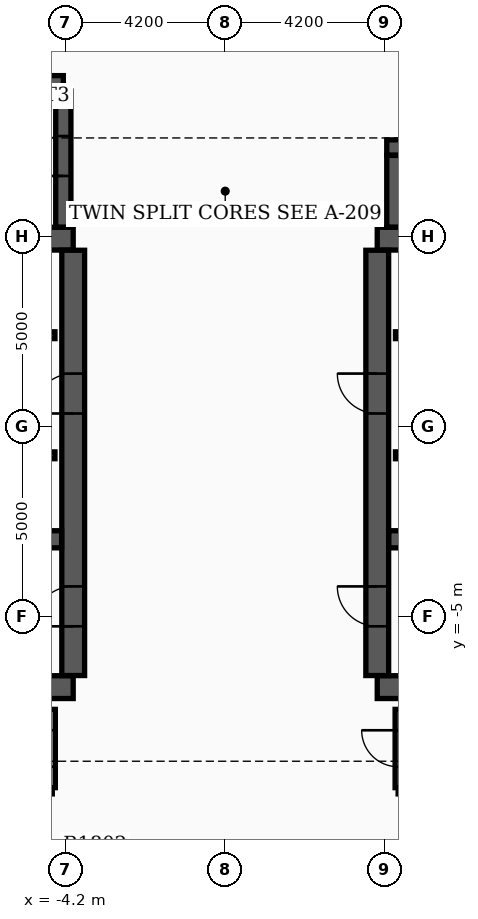
"""IFC4 building model, lengths in metres.
Left out: names, types, materials, properties, quantities, classifications, styles, units other than length and angle.
Written with IfcOpenShell. Run it as: python <this file> out.ifc"""

import sys

from ifc_helpers import new_model, si_unit, direction, frame, frame_2d, origin, place, context, subcontext, project, spatial, rectangle, extrude, element, fill, save


model = new_model("IFC4")
c1 = context("Model", 3, precision=1e-05, world=origin(), true_north=direction((0.0, 1.0)))
c2 = subcontext(c1, "Body", "Model", "MODEL_VIEW")
j1 = project(units=[si_unit("LENGTHUNIT", "METRE"), si_unit("PLANEANGLEUNIT", "RADIAN")], contexts=[c1])
p1 = place(None, origin())
s1 = spatial("IfcSite", under=j1, at=p1, CompositionType="ELEMENT")
p2 = place(p1, origin())
s2 = spatial("IfcBuilding", under=s1, at=p2, CompositionType="ELEMENT")
p3 = place(p2, frame((0.0, 0.0, 116.4)))
s3 = spatial("IfcBuildingStorey", under=s2, at=p3, CompositionType="ELEMENT", Elevation=116.4)
for number, where, z_axis, x_axis in (
    (1, (-12.4, -6.85, 0.0), (0.0, 0.0, 1.0), (1.0, 0.0, 0.0)),
    (2, (-12.4, 4.95, 0.0), (0.0, 0.0, 1.0), (1.0, 0.0, 0.0)),
):
    element("IfcWall", number, at=place(p3, frame(where, z_axis=z_axis, x_axis=x_axis)), inside=s3, PredefinedType="SHEAR", context=c2, shape_type="SweptSolid", body=[
        extrude(rectangle(XDim=8.4, YDim=0.6, at=frame_2d((4.2, 0.0))), origin(), (0.0, 0.0, 1.0), 3.7),
    ])
p4 = place(p3, frame((-4.0, -6.545, 0.0), z_axis=(0.0, 0.0, 1.0), x_axis=(0.0, 1.0, 0.0)))
e3 = element("IfcWall", 3, at=p4, inside=s3, PredefinedType="SHEAR", context=c2, shape_type="SweptSolid", body=[
    extrude(rectangle(XDim=11.19, YDim=0.6, at=frame_2d((5.595, 0.0))), origin(), (0.0, 0.0, 1.0), 3.7),
])
p5 = place(p4, frame((1.295, 0.0, 0.0)))
e4 = element("IfcOpeningElement", 4, at=p5, cuts=e3, PredefinedType="OPENING", context=c2, shape_type="SweptSolid", body=[
    extrude(rectangle(XDim=1.05, YDim=2.15, at=frame_2d((0.525, 1.075))), frame((0.0, 0.31, 0.0), z_axis=(0.0, -1.0, 0.0), x_axis=(1.0, 0.0, 0.0)), (0.0, 0.0, 1.0), 0.62),
])
p6 = place(p4, frame((6.895, 0.0, 0.0)))
e5 = element("IfcOpeningElement", 5, at=p6, cuts=e3, PredefinedType="OPENING", context=c2, shape_type="SweptSolid", body=[
    extrude(rectangle(XDim=1.05, YDim=2.15, at=frame_2d((0.525, 1.075))), frame((0.0, 0.31, 0.0), z_axis=(0.0, -1.0, 0.0), x_axis=(1.0, 0.0, 0.0)), (0.0, 0.0, 1.0), 0.62),
])
p7 = place(p3, frame((-12.095, -2.96, 0.0), z_axis=(0.0, 0.0, 1.0), x_axis=(1.0, 0.0, 0.0)))
e6 = element("IfcWall", 6, at=p7, inside=s3, PredefinedType="SHEAR", context=c2, shape_type="SweptSolid", body=[
    extrude(rectangle(XDim=7.79, YDim=0.45, at=frame_2d((3.895, 0.0))), origin(), (0.0, 0.0, 1.0), 3.7),
])
for number, where, z_axis, x_axis in (
    (7, (4.0, -6.85, 0.0), (0.0, 0.0, 1.0), (1.0, 0.0, 0.0)),
    (8, (4.0, 4.95, 0.0), (0.0, 0.0, 1.0), (1.0, 0.0, 0.0)),
):
    element("IfcWall", number, at=place(p3, frame(where, z_axis=z_axis, x_axis=x_axis)), inside=s3, PredefinedType="SHEAR", context=c2, shape_type="SweptSolid", body=[
        extrude(rectangle(XDim=8.4, YDim=0.6, at=frame_2d((4.2, 0.0))), origin(), (0.0, 0.0, 1.0), 3.7),
    ])
p8 = place(p3, frame((4.0, -6.545, 0.0), z_axis=(0.0, 0.0, 1.0), x_axis=(0.0, 1.0, 0.0)))
e9 = element("IfcWall", 9, at=p8, inside=s3, PredefinedType="SHEAR", context=c2, shape_type="SweptSolid", body=[
    extrude(rectangle(XDim=11.19, YDim=0.6, at=frame_2d((5.595, 0.0))), origin(), (0.0, 0.0, 1.0), 3.7),
])
p9 = place(p8, frame((1.295, 0.0, 0.0)))
e10 = element("IfcOpeningElement", 10, at=p9, cuts=e9, PredefinedType="OPENING", context=c2, shape_type="SweptSolid", body=[
    extrude(rectangle(XDim=1.05, YDim=2.15, at=frame_2d((0.525, 1.075))), frame((0.0, 0.31, 0.0), z_axis=(0.0, -1.0, 0.0), x_axis=(1.0, 0.0, 0.0)), (0.0, 0.0, 1.0), 0.62),
])
p10 = place(p8, frame((6.895, 0.0, 0.0)))
e11 = element("IfcOpeningElement", 11, at=p10, cuts=e9, PredefinedType="OPENING", context=c2, shape_type="SweptSolid", body=[
    extrude(rectangle(XDim=1.05, YDim=2.15, at=frame_2d((0.525, 1.075))), frame((0.0, 0.31, 0.0), z_axis=(0.0, -1.0, 0.0), x_axis=(1.0, 0.0, 0.0)), (0.0, 0.0, 1.0), 0.62),
])
p11 = place(p3, frame((4.305, -2.96, 0.0), z_axis=(0.0, 0.0, 1.0), x_axis=(1.0, 0.0, 0.0)))
e12 = element("IfcWall", 12, at=p11, inside=s3, PredefinedType="SHEAR", context=c2, shape_type="SweptSolid", body=[
    extrude(rectangle(XDim=7.79, YDim=0.45, at=frame_2d((3.895, 0.0))), origin(), (0.0, 0.0, 1.0), 3.7),
])
p12 = place(p3, frame((-12.22, 9.04, 0.0), z_axis=(0.0, 0.0, 1.0), x_axis=(1.0, 0.0, 0.0)))
e13 = element("IfcWall", 13, at=p12, inside=s3, PredefinedType="SHEAR", context=c2, shape_type="SweptSolid", body=[
    extrude(rectangle(XDim=7.96, YDim=0.4, at=frame_2d((3.98, 0.0))), origin(), (0.0, 0.0, 1.0), 3.7),
])
p13 = place(p3, frame((-4.26, 5.255, 0.0), z_axis=(0.0, 0.0, 1.0), x_axis=(0.0, 1.0, 0.0)))
e14 = element("IfcWall", 14, at=p13, inside=s3, PredefinedType="SHEAR", context=c2, shape_type="SweptSolid", body=[
    extrude(rectangle(XDim=3.58, YDim=0.4, at=frame_2d((1.79, 0.0))), origin(), (0.0, 0.0, 1.0), 3.7),
])
p14 = place(p13, frame((1.345, 0.0, 0.0)))
e15 = element("IfcOpeningElement", 15, at=p14, cuts=e14, PredefinedType="OPENING", context=c2, shape_type="SweptSolid", body=[
    extrude(rectangle(XDim=1.05, YDim=2.15, at=frame_2d((0.525, 1.075))), frame((0.0, 0.21, 0.0), z_axis=(0.0, -1.0, 0.0), x_axis=(1.0, 0.0, 0.0)), (0.0, 0.0, 1.0), 0.42),
])
p15 = place(p3, frame((4.45, 5.255, 0.0), z_axis=(0.0, 0.0, 1.0), x_axis=(0.0, 1.0, 0.0)))
e16 = element("IfcWall", 16, at=p15, inside=s3, PredefinedType="SHEAR", context=c2, shape_type="SweptSolid", body=[
    extrude(rectangle(XDim=1.885, YDim=0.4, at=frame_2d((0.942, 0.0))), origin(), (0.0, 0.0, 1.0), 3.7),
])
p16 = place(p3, frame((4.25, 7.35, 0.0), z_axis=(0.0, 0.0, 1.0), x_axis=(1.0, 0.0, 0.0)))
e17 = element("IfcWall", 17, at=p16, inside=s3, PredefinedType="SHEAR", context=c2, shape_type="SweptSolid", body=[
    extrude(rectangle(XDim=5.4, YDim=0.4, at=frame_2d((2.7, 0.0))), origin(), (0.0, 0.0, 1.0), 3.7),
])
p17 = place(p3, frame((-11.9, 2.41, 0.0), z_axis=(0.0, 0.0, 1.0), x_axis=(1.0, 0.0, 0.0)))
e18 = element("IfcWall", 18, at=p17, inside=s3, PredefinedType="SOLIDWALL", context=c2, shape_type="SweptSolid", body=[
    extrude(rectangle(XDim=7.42, YDim=0.18, at=frame_2d((3.71, 0.0))), origin(), (0.0, 0.0, 1.0), 2.96),
])
p18 = place(p17, frame((0.55, 0.0, 0.0)))
e19 = element("IfcOpeningElement", 19, at=p18, cuts=e18, PredefinedType="OPENING", context=c2, shape_type="SweptSolid", body=[
    extrude(rectangle(XDim=1.1, YDim=2.15, at=frame_2d((0.55, 1.075))), frame((0.0, 0.1, 0.0), z_axis=(0.0, -1.0, 0.0), x_axis=(1.0, 0.0, 0.0)), (0.0, 0.0, 1.0), 0.2),
])
p19 = place(p17, frame((4.9, 0.0, 0.0)))
e20 = element("IfcOpeningElement", 20, at=p19, cuts=e18, PredefinedType="OPENING", context=c2, shape_type="SweptSolid", body=[
    extrude(rectangle(XDim=0.88, YDim=2.1, at=frame_2d((0.44, 1.05))), frame((0.0, 0.1, 0.0), z_axis=(0.0, -1.0, 0.0), x_axis=(1.0, 0.0, 0.0)), (0.0, 0.0, 1.0), 0.2),
])
p20 = place(p3, frame((4.48, 2.41, 0.0), z_axis=(0.0, 0.0, 1.0), x_axis=(1.0, 0.0, 0.0)))
e21 = element("IfcWall", 21, at=p20, inside=s3, PredefinedType="SOLIDWALL", context=c2, shape_type="SweptSolid", body=[
    extrude(rectangle(XDim=7.42, YDim=0.18, at=frame_2d((3.71, 0.0))), origin(), (0.0, 0.0, 1.0), 2.96),
])
p21 = place(p20, frame((5.67, 0.0, 0.0)))
e22 = element("IfcOpeningElement", 22, at=p21, cuts=e21, PredefinedType="OPENING", context=c2, shape_type="SweptSolid", body=[
    extrude(rectangle(XDim=1.1, YDim=2.15, at=frame_2d((0.55, 1.075))), frame((0.0, 0.1, 0.0), z_axis=(0.0, -1.0, 0.0), x_axis=(1.0, 0.0, 0.0)), (0.0, 0.0, 1.0), 0.2),
])
p22 = place(p20, frame((1.6, 0.0, 0.0)))
e23 = element("IfcOpeningElement", 23, at=p22, cuts=e21, PredefinedType="OPENING", context=c2, shape_type="SweptSolid", body=[
    extrude(rectangle(XDim=0.88, YDim=2.1, at=frame_2d((0.44, 1.05))), frame((0.0, 0.1, 0.0), z_axis=(0.0, -1.0, 0.0), x_axis=(1.0, 0.0, 0.0)), (0.0, 0.0, 1.0), 0.2),
])
p23 = place(p3, frame((-11.9, -0.75, 0.0), z_axis=(0.0, 0.0, 1.0), x_axis=(1.0, 0.0, 0.0)))
e24 = element("IfcWall", 24, at=p23, inside=s3, PredefinedType="SOLIDWALL", context=c2, shape_type="SweptSolid", body=[
    extrude(rectangle(XDim=7.42, YDim=0.18, at=frame_2d((3.71, 0.0))), origin(), (0.0, 0.0, 1.0), 2.96),
])
p24 = place(p23, frame((0.45, 0.0, 0.0)))
e25 = element("IfcOpeningElement", 25, at=p24, cuts=e24, PredefinedType="OPENING", context=c2, shape_type="SweptSolid", body=[
    extrude(rectangle(XDim=1.1, YDim=2.15, at=frame_2d((0.55, 1.075))), frame((0.0, 0.1, 0.0), z_axis=(0.0, -1.0, 0.0), x_axis=(1.0, 0.0, 0.0)), (0.0, 0.0, 1.0), 0.2),
])
p25 = place(p23, frame((2.35, 0.0, 0.0)))
e26 = element("IfcOpeningElement", 26, at=p25, cuts=e24, PredefinedType="OPENING", context=c2, shape_type="SweptSolid", body=[
    extrude(rectangle(XDim=1.1, YDim=2.15, at=frame_2d((0.55, 1.075))), frame((0.0, 0.1, 0.0), z_axis=(0.0, -1.0, 0.0), x_axis=(1.0, 0.0, 0.0)), (0.0, 0.0, 1.0), 0.2),
])
p26 = place(p3, frame((4.48, -0.75, 0.0), z_axis=(0.0, 0.0, 1.0), x_axis=(1.0, 0.0, 0.0)))
e27 = element("IfcWall", 27, at=p26, inside=s3, PredefinedType="SOLIDWALL", context=c2, shape_type="SweptSolid", body=[
    extrude(rectangle(XDim=7.42, YDim=0.18, at=frame_2d((3.71, 0.0))), origin(), (0.0, 0.0, 1.0), 2.96),
])
p27 = place(p26, frame((0.52, 0.0, 0.0)))
e28 = element("IfcOpeningElement", 28, at=p27, cuts=e27, PredefinedType="OPENING", context=c2, shape_type="SweptSolid", body=[
    extrude(rectangle(XDim=1.1, YDim=2.15, at=frame_2d((0.55, 1.075))), frame((0.0, 0.1, 0.0), z_axis=(0.0, -1.0, 0.0), x_axis=(1.0, 0.0, 0.0)), (0.0, 0.0, 1.0), 0.2),
])
p28 = place(p3, frame((4.55, -9.58, 0.0), z_axis=(0.0, 0.0, 1.0), x_axis=(1.0, 0.0, 0.0)))
e29 = element("IfcWall", 29, at=p28, inside=s3, PredefinedType="PARTITIONING", context=c2, shape_type="SweptSolid", body=[
    extrude(rectangle(XDim=8.1, YDim=0.16, at=frame_2d((4.05, 0.0))), origin(), (0.0, 0.0, 1.0), 2.96),
])
p29 = place(p3, frame((4.55, -9.495, 0.0), z_axis=(0.0, 0.0, 1.0), x_axis=(0.0, 1.0, 0.0)))
e30 = element("IfcWall", 30, at=p29, inside=s3, PredefinedType="PARTITIONING", context=c2, shape_type="SweptSolid", body=[
    extrude(rectangle(XDim=2.06, YDim=0.16, at=frame_2d((1.03, 0.0))), origin(), (0.0, 0.0, 1.0), 2.96),
])
p30 = place(p29, frame((0.55, 0.0, 0.0)))
e31 = element("IfcOpeningElement", 31, at=p30, cuts=e30, PredefinedType="OPENING", context=c2, shape_type="SweptSolid", body=[
    extrude(rectangle(XDim=0.96, YDim=2.15, at=frame_2d((0.48, 1.075))), frame((0.0, 0.09, 0.0), z_axis=(0.0, -1.0, 0.0), x_axis=(1.0, 0.0, 0.0)), (0.0, 0.0, 1.0), 0.18),
])
p31 = place(p3, frame((-4.55, -9.495, 0.0), z_axis=(0.0, 0.0, 1.0), x_axis=(0.0, 1.0, 0.0)))
e32 = element("IfcWall", 32, at=p31, inside=s3, PredefinedType="PARTITIONING", context=c2, shape_type="SweptSolid", body=[
    extrude(rectangle(XDim=2.06, YDim=0.16, at=frame_2d((1.03, 0.0))), origin(), (0.0, 0.0, 1.0), 2.96),
])
p32 = place(p31, frame((0.55, 0.0, 0.0)))
e33 = element("IfcOpeningElement", 33, at=p32, cuts=e32, PredefinedType="OPENING", context=c2, shape_type="SweptSolid", body=[
    extrude(rectangle(XDim=0.96, YDim=2.15, at=frame_2d((0.48, 1.075))), frame((0.0, 0.09, 0.0), z_axis=(0.0, -1.0, 0.0), x_axis=(1.0, 0.0, 0.0)), (0.0, 0.0, 1.0), 0.18),
])
p33 = place(p5, origin())
e34 = element("IfcDoor", 34, at=p33, inside=s3, OperationType="SINGLE_SWING_LEFT", PredefinedType="DOOR", context=c2, shape_type="SweptSolid", body=[
    extrude(rectangle(XDim=1.05, YDim=2.15, at=frame_2d((0.525, 1.075))), frame((0.0, 0.025, 0.0), z_axis=(0.0, -1.0, 0.0), x_axis=(1.0, 0.0, 0.0)), (0.0, 0.0, 1.0), 0.05),
])
fill(e4, e34)
p34 = place(p9, origin())
e35 = element("IfcDoor", 35, at=p34, inside=s3, OperationType="SINGLE_SWING_RIGHT", PredefinedType="DOOR", context=c2, shape_type="SweptSolid", body=[
    extrude(rectangle(XDim=1.05, YDim=2.15, at=frame_2d((0.525, 1.075))), frame((0.0, 0.025, 0.0), z_axis=(0.0, -1.0, 0.0), x_axis=(1.0, 0.0, 0.0)), (0.0, 0.0, 1.0), 0.05),
])
fill(e10, e35)
p35 = place(p6, origin())
e36 = element("IfcDoor", 36, at=p35, inside=s3, OperationType="SINGLE_SWING_LEFT", PredefinedType="DOOR", context=c2, shape_type="SweptSolid", body=[
    extrude(rectangle(XDim=1.05, YDim=2.15, at=frame_2d((0.525, 1.075))), frame((0.0, 0.025, 0.0), z_axis=(0.0, -1.0, 0.0), x_axis=(1.0, 0.0, 0.0)), (0.0, 0.0, 1.0), 0.05),
])
fill(e5, e36)
p36 = place(p10, origin())
e37 = element("IfcDoor", 37, at=p36, inside=s3, OperationType="SINGLE_SWING_RIGHT", PredefinedType="DOOR", context=c2, shape_type="SweptSolid", body=[
    extrude(rectangle(XDim=1.05, YDim=2.15, at=frame_2d((0.525, 1.075))), frame((0.0, 0.025, 0.0), z_axis=(0.0, -1.0, 0.0), x_axis=(1.0, 0.0, 0.0)), (0.0, 0.0, 1.0), 0.05),
])
fill(e11, e37)
p37 = place(p14, origin())
e38 = element("IfcDoor", 38, at=p37, inside=s3, OperationType="SINGLE_SWING_LEFT", PredefinedType="DOOR", context=c2, shape_type="SweptSolid", body=[
    extrude(rectangle(XDim=1.05, YDim=2.15, at=frame_2d((0.525, 1.075))), frame((0.0, 0.025, 0.0), z_axis=(0.0, -1.0, 0.0), x_axis=(1.0, 0.0, 0.0)), (0.0, 0.0, 1.0), 0.05),
])
fill(e15, e38)
p38 = place(p30, origin())
e39 = element("IfcDoor", 39, at=p38, inside=s3, OperationType="SINGLE_SWING_RIGHT", PredefinedType="DOOR", context=c2, shape_type="SweptSolid", body=[
    extrude(rectangle(XDim=0.96, YDim=2.15, at=frame_2d((0.48, 1.075))), frame((0.0, 0.025, 0.0), z_axis=(0.0, -1.0, 0.0), x_axis=(1.0, 0.0, 0.0)), (0.0, 0.0, 1.0), 0.05),
])
fill(e31, e39)
p39 = place(p32, origin())
e40 = element("IfcDoor", 40, at=p39, inside=s3, OperationType="SINGLE_SWING_LEFT", PredefinedType="DOOR", context=c2, shape_type="SweptSolid", body=[
    extrude(rectangle(XDim=0.96, YDim=2.15, at=frame_2d((0.48, 1.075))), frame((0.0, 0.025, 0.0), z_axis=(0.0, -1.0, 0.0), x_axis=(1.0, 0.0, 0.0)), (0.0, 0.0, 1.0), 0.05),
])
fill(e33, e40)
save(model, sys.argv[1])
